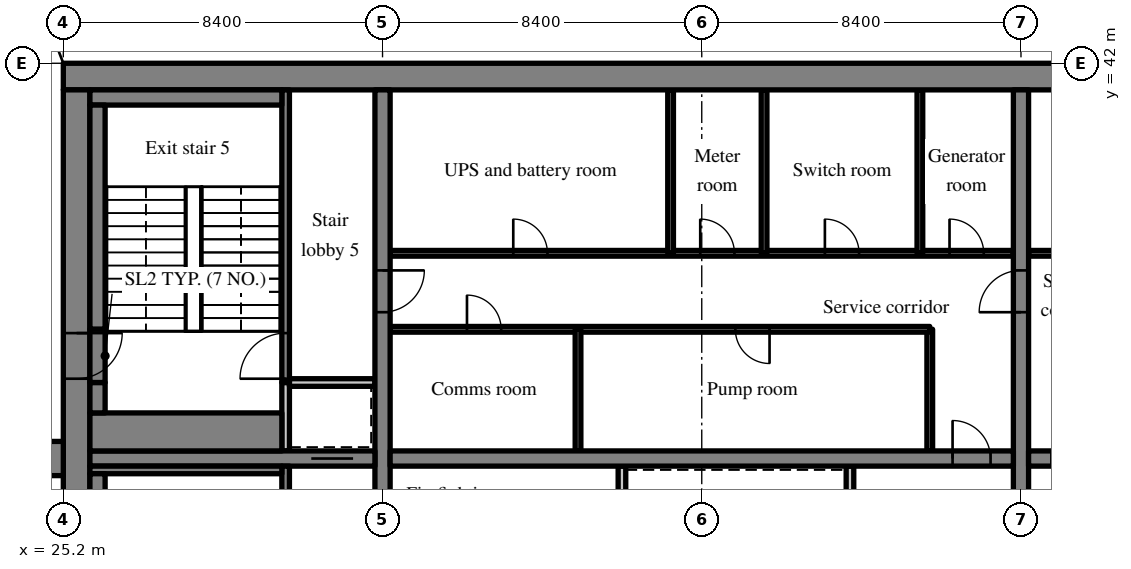
"""IFC4 building model, lengths in metres.
Left out: names, types, materials, properties, quantities, classifications, styles, units other than length and angle.
Written with IfcOpenShell. Run it as: python <this file> out.ifc"""

import sys

from ifc_helpers import new_model, si_unit, direction, frame, frame_2d, origin, place, context, subcontext, project, spatial, rectangle, extrude, source, transform, mapped, element, fill, save


model = new_model("IFC4")
c1 = context("Model", 3, precision=1e-05, world=origin(), true_north=direction((0.0, 1.0)))
c2 = subcontext(c1, "Body", "Model", "MODEL_VIEW")
j1 = project(units=[si_unit("LENGTHUNIT", "METRE"), si_unit("PLANEANGLEUNIT", "RADIAN")], contexts=[c1])
p1 = place(None, origin())
s1 = spatial("IfcSite", under=j1, at=p1, CompositionType="ELEMENT")
p2 = place(p1, origin())
s2 = spatial("IfcBuilding", under=s1, at=p2, CompositionType="ELEMENT")
p3 = place(p2, frame((0.0, 0.0, 201.0)))
s3 = spatial("IfcBuildingStorey", under=s2, at=p3, CompositionType="ELEMENT", Elevation=201.0)
m1 = source(origin(), c2, "Body", "SweptSolid", [
    extrude(rectangle(XDim=50.4, YDim=0.7, at=frame_2d((25.2, 0.0))), origin(), (0.0, 0.0, 1.0), 5.12),
])
p4 = place(p3, frame((25.2, 41.65, 0.0), z_axis=(0.0, 0.0, 1.0), x_axis=(1.0, 0.0, 0.0)))
e1 = element("IfcWall", 1, at=p4, inside=s3, PredefinedType="SHEAR", context=c2, shape_type="MappedRepresentation", body=[
    mapped(m1, transform((0.0, 0.0, 0.0), scale=1.0)),
])
m2 = source(origin(), c2, "Body", "SweptSolid", [
    extrude(rectangle(XDim=18.6, YDim=0.7, at=frame_2d((9.3, 0.0))), origin(), (0.0, 0.0, 1.0), 5.12),
])
p5 = place(p3, frame((25.55, 22.7, 0.0), z_axis=(0.0, 0.0, 1.0), x_axis=(0.0, 1.0, 0.0)))
e2 = element("IfcWall", 2, at=p5, inside=s3, PredefinedType="SHEAR", context=c2, shape_type="MappedRepresentation", body=[
    mapped(m2, transform((0.0, 0.0, 0.0), scale=1.0)),
])
m3 = source(origin(), c2, "Body", "SweptSolid", [
    extrude(rectangle(XDim=1.2, YDim=2.1, at=frame_2d((0.6, 1.05))), frame((0.0, 0.36, 0.0), z_axis=(0.0, -1.0, 0.0), x_axis=(1.0, 0.0, 0.0)), (0.0, 0.0, 1.0), 0.72),
])
p6 = place(p5, frame((11.0, 0.0, 0.0)))
e3 = element("IfcOpeningElement", 3, at=p6, cuts=e2, PredefinedType="OPENING", context=c2, shape_type="MappedRepresentation", body=[
    mapped(m3, transform((0.0, 0.0, 0.0), scale=1.0)),
])
m4 = source(origin(), c2, "Body", "SweptSolid", [
    extrude(rectangle(XDim=18.6, YDim=0.4, at=frame_2d((9.3, 0.0))), origin(), (0.0, 0.0, 1.0), 5.12),
])
p7 = place(p3, frame((33.6, 22.7, 0.0), z_axis=(0.0, 0.0, 1.0), x_axis=(0.0, 1.0, 0.0)))
e4 = element("IfcWall", 4, at=p7, inside=s3, PredefinedType="SHEAR", context=c2, shape_type="MappedRepresentation", body=[
    mapped(m4, transform((0.0, 0.0, 0.0), scale=1.0)),
])
m5 = source(origin(), c2, "Body", "SweptSolid", [
    extrude(rectangle(XDim=1.1, YDim=2.1, at=frame_2d((0.55, 1.05))), frame((0.0, 0.21, 0.0), z_axis=(0.0, -1.0, 0.0), x_axis=(1.0, 0.0, 0.0)), (0.0, 0.0, 1.0), 0.42),
])
p8 = place(p7, frame((12.75, 0.0, 0.0)))
e5 = element("IfcOpeningElement", 5, at=p8, cuts=e4, PredefinedType="OPENING", context=c2, shape_type="MappedRepresentation", body=[
    mapped(m5, transform((0.0, 0.0, 0.0), scale=1.0)),
])
p9 = place(p3, frame((50.4, 22.7, 0.0), z_axis=(0.0, 0.0, 1.0), x_axis=(0.0, 1.0, 0.0)))
e6 = element("IfcWall", 6, at=p9, inside=s3, PredefinedType="SHEAR", context=c2, shape_type="MappedRepresentation", body=[
    mapped(m4, transform((0.0, 0.0, 0.0), scale=1.0)),
])
p10 = place(p9, frame((12.75, 0.0, 0.0)))
e7 = element("IfcOpeningElement", 7, at=p10, cuts=e6, PredefinedType="OPENING", context=c2, shape_type="MappedRepresentation", body=[
    mapped(m5, transform((0.0, 0.0, 0.0), scale=1.0)),
])
m6 = source(origin(), c2, "Body", "SweptSolid", [
    extrude(rectangle(XDim=7.5, YDim=0.4, at=frame_2d((3.75, 0.0))), origin(), (0.0, 0.0, 1.0), 5.12),
])
p11 = place(p3, frame((25.9, 31.6, 0.0), z_axis=(0.0, 0.0, 1.0), x_axis=(1.0, 0.0, 0.0)))
e8 = element("IfcWall", 8, at=p11, inside=s3, PredefinedType="SHEAR", context=c2, shape_type="MappedRepresentation", body=[
    mapped(m6, transform((0.0, 0.0, 0.0), scale=1.0)),
])
p12 = place(p11, frame((5.825, 0.0, 0.0)))
e9 = element("IfcOpeningElement", 9, at=p12, cuts=e8, PredefinedType="OPENING", context=c2, shape_type="MappedRepresentation", body=[
    mapped(m5, transform((0.0, 0.0, 0.0), scale=1.0)),
])
m7 = source(origin(), c2, "Body", "SweptSolid", [
    extrude(rectangle(XDim=16.4, YDim=0.4, at=frame_2d((8.2, 0.0))), origin(), (0.0, 0.0, 1.0), 5.12),
])
p13 = place(p3, frame((33.8, 31.6, 0.0), z_axis=(0.0, 0.0, 1.0), x_axis=(1.0, 0.0, 0.0)))
e10 = element("IfcWall", 10, at=p13, inside=s3, PredefinedType="SHEAR", context=c2, shape_type="MappedRepresentation", body=[
    mapped(m7, transform((0.0, 0.0, 0.0), scale=1.0)),
])
m8 = source(origin(), c2, "Body", "SweptSolid", [
    extrude(rectangle(XDim=1.0, YDim=2.1, at=frame_2d((0.5, 1.05))), frame((0.0, 0.21, 0.0), z_axis=(0.0, -1.0, 0.0), x_axis=(1.0, 0.0, 0.0)), (0.0, 0.0, 1.0), 0.42),
])
p14 = place(p13, frame((14.8, 0.0, 0.0)))
e11 = element("IfcOpeningElement", 11, at=p14, cuts=e10, PredefinedType="OPENING", context=c2, shape_type="MappedRepresentation", body=[
    mapped(m8, transform((0.0, 0.0, 0.0), scale=1.0)),
])
p15 = place(p3, frame((50.6, 31.6, 0.0), z_axis=(0.0, 0.0, 1.0), x_axis=(1.0, 0.0, 0.0)))
e12 = element("IfcWall", 12, at=p15, inside=s3, PredefinedType="SHEAR", context=c2, shape_type="MappedRepresentation", body=[
    mapped(m7, transform((0.0, 0.0, 0.0), scale=1.0)),
])
p16 = place(p15, frame((0.6, 0.0, 0.0)))
e13 = element("IfcOpeningElement", 13, at=p16, cuts=e12, PredefinedType="OPENING", context=c2, shape_type="MappedRepresentation", body=[
    mapped(m8, transform((0.0, 0.0, 0.0), scale=1.0)),
])
m9 = source(origin(), c2, "Body", "SweptSolid", [
    extrude(rectangle(XDim=8.25, YDim=0.9, at=frame_2d((4.125, 0.0))), origin(), (0.0, 0.0, 1.0), 5.12),
])
p17 = place(p3, frame((16.95, 31.6, 0.0), z_axis=(0.0, 0.0, 1.0), x_axis=(1.0, 0.0, 0.0)))
e14 = element("IfcWall", 14, at=p17, inside=s3, PredefinedType="SHEAR", context=c2, shape_type="MappedRepresentation", body=[
    mapped(m9, transform((0.0, 0.0, 0.0), scale=1.0)),
])
m10 = source(origin(), c2, "Body", "SweptSolid", [
    extrude(rectangle(XDim=8.7, YDim=0.2, at=frame_2d((4.35, 0.0))), origin(), (0.0, 0.0, 1.0), 5.12),
])
for number, where, z_axis, x_axis in (
    (15, (45.9, 22.7, 0.0), (0.0, 0.0, 1.0), (0.0, 1.0, 0.0)),
    (16, (39.9, 22.7, 0.0), (0.0, 0.0, 1.0), (0.0, 1.0, 0.0)),
):
    element("IfcWall", number, at=place(p3, frame(where, z_axis=z_axis, x_axis=x_axis)), inside=s3, PredefinedType="PARTITIONING", context=c2, shape_type="MappedRepresentation", body=[
        mapped(m10, transform((0.0, 0.0, 0.0), scale=1.0)),
    ])
m11 = source(origin(), c2, "Body", "SweptSolid", [
    extrude(rectangle(XDim=3.2, YDim=0.15, at=frame_2d((1.6, 0.0))), origin(), (0.0, 0.0, 1.0), 5.12),
])
p18 = place(p3, frame((48.0, 31.8, 0.0), z_axis=(0.0, 0.0, 1.0), x_axis=(0.0, 1.0, 0.0)))
e17 = element("IfcWall", 17, at=p18, inside=s3, PredefinedType="PARTITIONING", context=c2, shape_type="MappedRepresentation", body=[
    mapped(m11, transform((0.0, 0.0, 0.0), scale=1.0)),
])
m12 = source(origin(), c2, "Body", "SweptSolid", [
    extrude(rectangle(XDim=14.2, YDim=0.15, at=frame_2d((7.1, 0.0))), origin(), (0.0, 0.0, 1.0), 5.12),
])
p19 = place(p3, frame((33.8, 35.0, 0.0), z_axis=(0.0, 0.0, 1.0), x_axis=(1.0, 0.0, 0.0)))
e18 = element("IfcWall", 18, at=p19, inside=s3, PredefinedType="PARTITIONING", context=c2, shape_type="MappedRepresentation", body=[
    mapped(m12, transform((0.0, 0.0, 0.0), scale=1.0)),
])
m13 = source(origin(), c2, "Body", "SweptSolid", [
    extrude(rectangle(XDim=0.9, YDim=2.1, at=frame_2d((0.45, 1.05))), frame((0.0, 0.085, 0.0), z_axis=(0.0, -1.0, 0.0), x_axis=(1.0, 0.0, 0.0)), (0.0, 0.0, 1.0), 0.17),
])
p20 = place(p19, frame((2.022, 0.0, 0.0)))
e19 = element("IfcOpeningElement", 19, at=p20, cuts=e18, PredefinedType="OPENING", context=c2, shape_type="MappedRepresentation", body=[
    mapped(m13, transform((0.0, 0.0, 0.0), scale=1.0)),
])
p21 = place(p19, frame((9.084, 0.0, 0.0)))
e20 = element("IfcOpeningElement", 20, at=p21, cuts=e18, PredefinedType="OPENING", context=c2, shape_type="MappedRepresentation", body=[
    mapped(m13, transform((0.0, 0.0, 0.0), scale=1.0)),
])
m14 = source(origin(), c2, "Body", "SweptSolid", [
    extrude(rectangle(XDim=16.4, YDim=0.15, at=frame_2d((8.2, 0.0))), origin(), (0.0, 0.0, 1.0), 5.12),
])
p22 = place(p3, frame((33.8, 37.0, 0.0), z_axis=(0.0, 0.0, 1.0), x_axis=(1.0, 0.0, 0.0)))
e21 = element("IfcWall", 21, at=p22, inside=s3, PredefinedType="PARTITIONING", context=c2, shape_type="MappedRepresentation", body=[
    mapped(m14, transform((0.0, 0.0, 0.0), scale=1.0)),
])
p23 = place(p22, frame((3.24, 0.0, 0.0)))
e22 = element("IfcOpeningElement", 22, at=p23, cuts=e21, PredefinedType="OPENING", context=c2, shape_type="MappedRepresentation", body=[
    mapped(m13, transform((0.0, 0.0, 0.0), scale=1.0)),
])
p24 = place(p22, frame((8.16, 0.0, 0.0)))
e23 = element("IfcOpeningElement", 23, at=p24, cuts=e21, PredefinedType="OPENING", context=c2, shape_type="MappedRepresentation", body=[
    mapped(m13, transform((0.0, 0.0, 0.0), scale=1.0)),
])
p25 = place(p22, frame((11.44, 0.0, 0.0)))
e24 = element("IfcOpeningElement", 24, at=p25, cuts=e21, PredefinedType="OPENING", context=c2, shape_type="MappedRepresentation", body=[
    mapped(m13, transform((0.0, 0.0, 0.0), scale=1.0)),
])
p26 = place(p22, frame((14.72, 0.0, 0.0)))
e25 = element("IfcOpeningElement", 25, at=p26, cuts=e21, PredefinedType="OPENING", context=c2, shape_type="MappedRepresentation", body=[
    mapped(m13, transform((0.0, 0.0, 0.0), scale=1.0)),
])
p27 = place(p3, frame((38.744, 31.8, 0.0), z_axis=(0.0, 0.0, 1.0), x_axis=(0.0, 1.0, 0.0)))
e26 = element("IfcWall", 26, at=p27, inside=s3, PredefinedType="PARTITIONING", context=c2, shape_type="MappedRepresentation", body=[
    mapped(m11, transform((0.0, 0.0, 0.0), scale=1.0)),
])
m15 = source(origin(), c2, "Body", "SweptSolid", [
    extrude(rectangle(XDim=4.3, YDim=0.15, at=frame_2d((2.15, 0.0))), origin(), (0.0, 0.0, 1.0), 5.12),
])
for number, where, z_axis, x_axis in (
    (27, (41.18, 37.0, 0.0), (0.0, 0.0, 1.0), (0.0, 1.0, 0.0)),
    (28, (43.64, 37.0, 0.0), (0.0, 0.0, 1.0), (0.0, 1.0, 0.0)),
    (29, (47.74, 37.0, 0.0), (0.0, 0.0, 1.0), (0.0, 1.0, 0.0)),
):
    element("IfcWall", number, at=place(p3, frame(where, z_axis=z_axis, x_axis=x_axis)), inside=s3, PredefinedType="PARTITIONING", context=c2, shape_type="MappedRepresentation", body=[
        mapped(m15, transform((0.0, 0.0, 0.0), scale=1.0)),
    ])
p28 = place(p3, frame((67.0, 37.0, 0.0), z_axis=(0.0, 0.0, 1.0), x_axis=(-1.0, 0.0, 0.0)))
e30 = element("IfcWall", 30, at=p28, inside=s3, PredefinedType="PARTITIONING", context=c2, shape_type="MappedRepresentation", body=[
    mapped(m14, transform((0.0, 0.0, 0.0), scale=1.0)),
])
p29 = place(p28, frame((0.78, 0.0, 0.0)))
e31 = element("IfcOpeningElement", 31, at=p29, cuts=e30, PredefinedType="OPENING", context=c2, shape_type="MappedRepresentation", body=[
    mapped(m13, transform((0.0, 0.0, 0.0), scale=1.0)),
])
p30 = place(p28, frame((3.65, 0.0, 0.0)))
e32 = element("IfcOpeningElement", 32, at=p30, cuts=e30, PredefinedType="OPENING", context=c2, shape_type="MappedRepresentation", body=[
    mapped(m13, transform((0.0, 0.0, 0.0), scale=1.0)),
])
p31 = place(p28, frame((9.39, 0.0, 0.0)))
e33 = element("IfcOpeningElement", 33, at=p31, cuts=e30, PredefinedType="OPENING", context=c2, shape_type="MappedRepresentation", body=[
    mapped(m13, transform((0.0, 0.0, 0.0), scale=1.0)),
])
p32 = place(p28, frame((14.72, 0.0, 0.0)))
e34 = element("IfcOpeningElement", 34, at=p32, cuts=e30, PredefinedType="OPENING", context=c2, shape_type="MappedRepresentation", body=[
    mapped(m13, transform((0.0, 0.0, 0.0), scale=1.0)),
])
m16 = source(origin(), c2, "Body", "SweptSolid", [
    extrude(rectangle(XDim=8.7, YDim=0.2, at=frame_2d((4.35, 0.0))), origin(), (0.0, 0.0, 1.0), 5.12),
])
p33 = place(p3, frame((31.05, 22.7, 0.0), z_axis=(0.0, 0.0, 1.0), x_axis=(0.0, 1.0, 0.0)))
e35 = element("IfcWall", 35, at=p33, inside=s3, PredefinedType="SOLIDWALL", context=c2, shape_type="MappedRepresentation", body=[
    mapped(m16, transform((0.0, 0.0, 0.0), scale=1.0)),
])
m17 = source(origin(), c2, "Body", "SweptSolid", [
    extrude(rectangle(XDim=1.2, YDim=2.1, at=frame_2d((0.6, 1.05))), frame((0.0, 0.11, 0.0), z_axis=(0.0, -1.0, 0.0), x_axis=(1.0, 0.0, 0.0)), (0.0, 0.0, 1.0), 0.22),
])
p34 = place(p33, frame((0.9, 0.0, 0.0)))
e36 = element("IfcOpeningElement", 36, at=p34, cuts=e35, PredefinedType="OPENING", context=c2, shape_type="MappedRepresentation", body=[
    mapped(m17, transform((0.0, 0.0, 0.0), scale=1.0)),
])
m18 = source(origin(), c2, "Body", "SweptSolid", [
    extrude(rectangle(XDim=1.8, YDim=0.2, at=frame_2d((0.9, 0.0))), origin(), (0.0, 0.0, 1.0), 5.12),
])
p35 = place(p3, frame((31.05, 31.8, 0.0), z_axis=(0.0, 0.0, 1.0), x_axis=(0.0, 1.0, 0.0)))
e37 = element("IfcWall", 37, at=p35, inside=s3, PredefinedType="SOLIDWALL", context=c2, shape_type="MappedRepresentation", body=[
    mapped(m18, transform((0.0, 0.0, 0.0), scale=1.0)),
])
m19 = source(origin(), c2, "Body", "SweptSolid", [
    extrude(rectangle(XDim=2.25, YDim=0.2, at=frame_2d((1.125, 0.0))), origin(), (0.0, 0.0, 1.0), 5.12),
])
p36 = place(p3, frame((31.15, 33.6, 0.0), z_axis=(0.0, 0.0, 1.0), x_axis=(1.0, 0.0, 0.0)))
e38 = element("IfcWall", 38, at=p36, inside=s3, PredefinedType="SOLIDWALL", context=c2, shape_type="MappedRepresentation", body=[
    mapped(m19, transform((0.0, 0.0, 0.0), scale=1.0)),
])
m20 = source(origin(), c2, "Body", "SweptSolid", [
    extrude(rectangle(XDim=7.7, YDim=0.2, at=frame_2d((3.85, 0.0))), origin(), (0.0, 0.0, 1.0), 5.12),
])
p37 = place(p3, frame((31.05, 33.6, 0.0), z_axis=(0.0, 0.0, 1.0), x_axis=(0.0, 1.0, 0.0)))
e39 = element("IfcWall", 39, at=p37, inside=s3, PredefinedType="SOLIDWALL", context=c2, shape_type="MappedRepresentation", body=[
    mapped(m20, transform((0.0, 0.0, 0.0), scale=1.0)),
])
p38 = place(p37, frame((0.1, 0.0, 0.0)))
e40 = element("IfcOpeningElement", 40, at=p38, cuts=e39, PredefinedType="OPENING", context=c2, shape_type="MappedRepresentation", body=[
    mapped(m17, transform((0.0, 0.0, 0.0), scale=1.0)),
])
m21 = source(origin(), c2, "Body", "SweptSolid", [
    extrude(rectangle(XDim=5.05, YDim=0.2, at=frame_2d((2.525, 0.0))), origin(), (0.0, 0.0, 1.0), 5.12),
])
p39 = place(p3, frame((25.9, 31.3, 0.0), z_axis=(0.0, 0.0, 1.0), x_axis=(1.0, 0.0, 0.0)))
e41 = element("IfcWall", 41, at=p39, inside=s3, PredefinedType="SOLIDWALL", context=c2, shape_type="MappedRepresentation", body=[
    mapped(m21, transform((0.0, 0.0, 0.0), scale=1.0)),
])
m22 = source(origin(), c2, "Body", "SweptSolid", [
    extrude(rectangle(XDim=8.1, YDim=0.4, at=frame_2d((4.05, 0.0))), origin(), (0.0, 0.0, 1.0), 5.12),
])
p40 = place(p3, frame((26.1, 23.1, 0.0), z_axis=(0.0, 0.0, 1.0), x_axis=(0.0, 1.0, 0.0)))
e42 = element("IfcWall", 42, at=p40, inside=s3, PredefinedType="SOLIDWALL", context=c2, shape_type="MappedRepresentation", body=[
    mapped(m22, transform((0.0, 0.0, 0.0), scale=1.0)),
])
m23 = source(origin(), c2, "Body", "SweptSolid", [
    extrude(rectangle(XDim=5.05, YDim=0.4, at=frame_2d((2.525, 0.0))), origin(), (0.0, 0.0, 1.0), 5.12),
])
p41 = place(p3, frame((25.9, 41.1, 0.0), z_axis=(0.0, 0.0, 1.0), x_axis=(1.0, 0.0, 0.0)))
e43 = element("IfcWall", 43, at=p41, inside=s3, PredefinedType="SOLIDWALL", context=c2, shape_type="MappedRepresentation", body=[
    mapped(m23, transform((0.0, 0.0, 0.0), scale=1.0)),
])
m24 = source(origin(), c2, "Body", "SweptSolid", [
    extrude(rectangle(XDim=5.05, YDim=1.0, at=frame_2d((2.525, 0.0))), origin(), (0.0, 0.0, 1.0), 5.12),
])
p42 = place(p3, frame((25.9, 32.3, 0.0), z_axis=(0.0, 0.0, 1.0), x_axis=(1.0, 0.0, 0.0)))
e44 = element("IfcWall", 44, at=p42, inside=s3, PredefinedType="SOLIDWALL", context=c2, shape_type="MappedRepresentation", body=[
    mapped(m24, transform((0.0, 0.0, 0.0), scale=1.0)),
])
m25 = source(origin(), c2, "Body", "SweptSolid", [
    extrude(rectangle(XDim=0.8, YDim=0.4, at=frame_2d((0.4, 0.0))), origin(), (0.0, 0.0, 1.0), 5.12),
])
p43 = place(p3, frame((26.1, 32.8, 0.0), z_axis=(0.0, 0.0, 1.0), x_axis=(0.0, 1.0, 0.0)))
e45 = element("IfcWall", 45, at=p43, inside=s3, PredefinedType="SOLIDWALL", context=c2, shape_type="MappedRepresentation", body=[
    mapped(m25, transform((0.0, 0.0, 0.0), scale=1.0)),
])
m26 = source(origin(), c2, "Body", "SweptSolid", [
    extrude(rectangle(XDim=5.9, YDim=0.4, at=frame_2d((2.95, 0.0))), origin(), (0.0, 0.0, 1.0), 5.12),
])
p44 = place(p3, frame((26.1, 35.0, 0.0), z_axis=(0.0, 0.0, 1.0), x_axis=(0.0, 1.0, 0.0)))
e46 = element("IfcWall", 46, at=p44, inside=s3, PredefinedType="SOLIDWALL", context=c2, shape_type="MappedRepresentation", body=[
    mapped(m26, transform((0.0, 0.0, 0.0), scale=1.0)),
])
m27 = source(origin(), c2, "Body", "SweptSolid", [
    extrude(rectangle(XDim=1.4, YDim=0.4, at=frame_2d((0.7, 0.0))), origin(), (0.0, 0.0, 1.0), 2.12),
])
p45 = place(p3, frame((26.1, 33.6, 3.0), z_axis=(0.0, 0.0, 1.0), x_axis=(0.0, 1.0, 0.0)))
e47 = element("IfcWall", 47, at=p45, inside=s3, PredefinedType="SOLIDWALL", context=c2, shape_type="MappedRepresentation", body=[
    mapped(m27, transform((0.0, 0.0, 0.0), scale=1.0)),
])
m28 = source(origin(), c2, "Body", "SweptSolid", [
    extrude(rectangle(XDim=1.0, YDim=2.1, at=frame_2d((0.5, 1.05))), frame((0.0, 0.025, 0.0), z_axis=(0.0, -1.0, 0.0), x_axis=(1.0, 0.0, 0.0)), (0.0, 0.0, 1.0), 0.05),
])
p46 = place(p14, origin())
e48 = element("IfcDoor", 48, at=p46, inside=s3, OperationType="SINGLE_SWING_LEFT", PredefinedType="DOOR", context=c2, shape_type="MappedRepresentation", body=[
    mapped(m28, transform((0.0, 0.0, 0.0), scale=1.0)),
])
fill(e11, e48)
m29 = source(origin(), c2, "Body", "SweptSolid", [
    extrude(rectangle(XDim=0.9, YDim=2.1, at=frame_2d((0.45, 1.05))), frame((0.0, 0.025, 0.0), z_axis=(0.0, -1.0, 0.0), x_axis=(1.0, 0.0, 0.0)), (0.0, 0.0, 1.0), 0.05),
])
p47 = place(p20, origin())
e49 = element("IfcDoor", 49, at=p47, inside=s3, OperationType="SINGLE_SWING_LEFT", PredefinedType="DOOR", context=c2, shape_type="MappedRepresentation", body=[
    mapped(m29, transform((0.0, 0.0, 0.0), scale=1.0)),
])
fill(e19, e49)
p48 = place(p21, origin())
e50 = element("IfcDoor", 50, at=p48, inside=s3, OperationType="SINGLE_SWING_RIGHT", PredefinedType="DOOR", context=c2, shape_type="MappedRepresentation", body=[
    mapped(m29, transform((0.0, 0.0, 0.0), scale=1.0)),
])
fill(e20, e50)
p49 = place(p23, origin())
e51 = element("IfcDoor", 51, at=p49, inside=s3, OperationType="SINGLE_SWING_LEFT", PredefinedType="DOOR", context=c2, shape_type="MappedRepresentation", body=[
    mapped(m29, transform((0.0, 0.0, 0.0), scale=1.0)),
])
fill(e22, e51)
p50 = place(p24, origin())
e52 = element("IfcDoor", 52, at=p50, inside=s3, OperationType="SINGLE_SWING_LEFT", PredefinedType="DOOR", context=c2, shape_type="MappedRepresentation", body=[
    mapped(m29, transform((0.0, 0.0, 0.0), scale=1.0)),
])
fill(e23, e52)
p51 = place(p25, origin())
e53 = element("IfcDoor", 53, at=p51, inside=s3, OperationType="SINGLE_SWING_LEFT", PredefinedType="DOOR", context=c2, shape_type="MappedRepresentation", body=[
    mapped(m29, transform((0.0, 0.0, 0.0), scale=1.0)),
])
fill(e24, e53)
p52 = place(p26, origin())
e54 = element("IfcDoor", 54, at=p52, inside=s3, OperationType="SINGLE_SWING_LEFT", PredefinedType="DOOR", context=c2, shape_type="MappedRepresentation", body=[
    mapped(m29, transform((0.0, 0.0, 0.0), scale=1.0)),
])
fill(e25, e54)
m30 = source(origin(), c2, "Body", "SweptSolid", [
    extrude(rectangle(XDim=1.1, YDim=2.1, at=frame_2d((0.55, 1.05))), frame((0.0, 0.025, 0.0), z_axis=(0.0, -1.0, 0.0), x_axis=(1.0, 0.0, 0.0)), (0.0, 0.0, 1.0), 0.05),
])
p53 = place(p12, origin())
e55 = element("IfcDoor", 55, at=p53, inside=s3, OperationType="SLIDING_TO_LEFT", PredefinedType="DOOR", context=c2, shape_type="MappedRepresentation", body=[
    mapped(m30, transform((0.0, 0.0, 0.0), scale=1.0)),
])
fill(e9, e55)
m31 = source(origin(), c2, "Body", "SweptSolid", [
    extrude(rectangle(XDim=1.2, YDim=2.1, at=frame_2d((0.6, 1.05))), frame((0.0, 0.025, 0.0), z_axis=(0.0, -1.0, 0.0), x_axis=(1.0, 0.0, 0.0)), (0.0, 0.0, 1.0), 0.05),
])
p54 = place(p38, origin())
e56 = element("IfcDoor", 56, at=p54, inside=s3, OperationType="SINGLE_SWING_LEFT", PredefinedType="DOOR", context=c2, shape_type="MappedRepresentation", body=[
    mapped(m31, transform((0.0, 0.0, 0.0), scale=1.0)),
])
fill(e40, e56)
p55 = place(p8, origin())
e57 = element("IfcDoor", 57, at=p55, inside=s3, OperationType="SINGLE_SWING_RIGHT", PredefinedType="DOOR", context=c2, shape_type="MappedRepresentation", body=[
    mapped(m30, transform((0.0, 0.0, 0.0), scale=1.0)),
])
fill(e5, e57)
p56 = place(p10, origin())
e58 = element("IfcDoor", 58, at=p56, inside=s3, OperationType="SINGLE_SWING_LEFT", PredefinedType="DOOR", context=c2, shape_type="MappedRepresentation", body=[
    mapped(m30, transform((0.0, 0.0, 0.0), scale=1.0)),
])
fill(e7, e58)
p57 = place(p6, origin())
e59 = element("IfcDoor", 59, at=p57, inside=s3, OperationType="SINGLE_SWING_RIGHT", PredefinedType="DOOR", context=c2, shape_type="MappedRepresentation", body=[
    mapped(m31, transform((0.0, 0.0, 0.0), scale=1.0)),
])
fill(e3, e59)
save(model, sys.argv[1])
